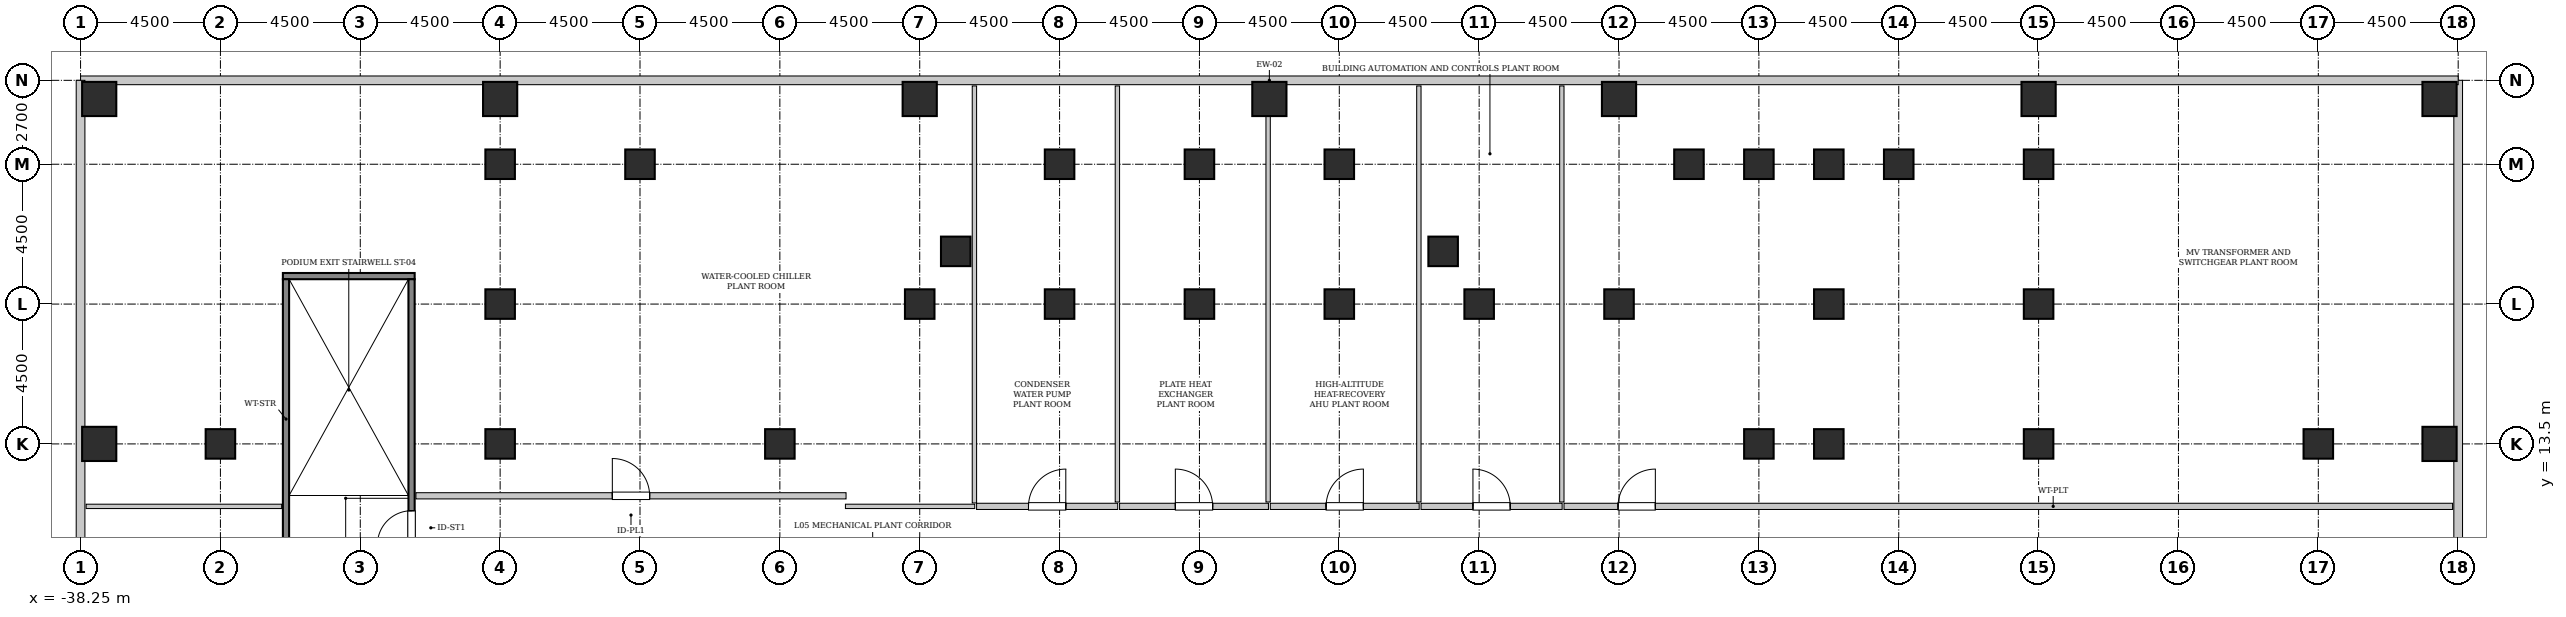
"""IFC4 building model, lengths in metres.
Left out: names, types, materials, properties, quantities, classifications, styles, units other than length and angle.
Written with IfcOpenShell. Run it as: python <this file> out.ifc"""

import sys

from ifc_helpers import new_model, si_unit, direction, frame, frame_2d, origin, origin_2d, place, context, subcontext, project, spatial, rectangle, hollow_rectangle, extrude, source, transform, mapped, element, fill, save


model = new_model("IFC4")
c1 = context("Model", 3, precision=1e-05, world=origin(), true_north=direction((0.0, 1.0)))
c2 = subcontext(c1, "Body", "Model", "MODEL_VIEW")
j1 = project(units=[si_unit("LENGTHUNIT", "METRE"), si_unit("PLANEANGLEUNIT", "RADIAN")], contexts=[c1])
p1 = place(None, origin())
s1 = spatial("IfcSite", under=j1, at=p1, CompositionType="ELEMENT")
p2 = place(p1, origin())
s2 = spatial("IfcBuilding", under=s1, at=p2, CompositionType="ELEMENT")
p3 = place(p2, frame((0.0, 0.0, 27.6)))
s3 = spatial("IfcBuildingStorey", under=s2, at=p3, CompositionType="ELEMENT", Elevation=27.6)
m1 = source(origin(), c2, "Body", "SweptSolid", [
    extrude(hollow_rectangle(XDim=1.1, YDim=1.1, WallThickness=0.055, InnerFilletRadius=0.055, OuterFilletRadius=0.11, at=origin_2d()), origin(), (0.0, 0.0, 1.0), 5.4),
])
for number, where, z_axis, x_axis in (
    (1, (-37.65, 13.5, 0.0), (0.0, 0.0, 1.0), (1.0, 0.0, 0.0)),
    (2, (-37.65, 24.6, 0.0), (0.0, 0.0, 1.0), (1.0, 0.0, 0.0)),
    (3, (-24.75, 24.6, 0.0), (0.0, 0.0, 1.0), (1.0, 0.0, 0.0)),
    (4, (-11.25, 24.6, 0.0), (0.0, 0.0, 1.0), (1.0, 0.0, 0.0)),
    (5, (0.0, 24.6, 0.0), (0.0, 0.0, 1.0), (1.0, 0.0, 0.0)),
    (6, (11.25, 24.6, 0.0), (0.0, 0.0, 1.0), (1.0, 0.0, 0.0)),
    (7, (24.75, 24.6, 0.0), (0.0, 0.0, 1.0), (1.0, 0.0, 0.0)),
    (8, (37.65, 13.5, 0.0), (0.0, 0.0, 1.0), (1.0, 0.0, 0.0)),
    (9, (37.65, 24.6, 0.0), (0.0, 0.0, 1.0), (1.0, 0.0, 0.0)),
):
    element("IfcColumn", number, at=place(p3, frame(where, z_axis=z_axis, x_axis=x_axis)), inside=s3, PredefinedType="COLUMN", context=c2, shape_type="MappedRepresentation", body=[
        mapped(m1, transform((0.0, 0.0, 0.0), x_axis=(1.0, 0.0, 0.0), y_axis=(0.0, 1.0, 0.0), z_axis=(0.0, 0.0, 1.0), scale=1.0)),
    ])
m2 = source(origin(), c2, "Body", "SweptSolid", [
    extrude(hollow_rectangle(XDim=0.95, YDim=0.95, WallThickness=0.045, InnerFilletRadius=0.045, OuterFilletRadius=0.09, at=origin_2d()), origin(), (0.0, 0.0, 1.0), 5.4),
])
for number, where, z_axis, x_axis in (
    (10, (-33.75, 13.5, 0.0), (0.0, 0.0, 1.0), (1.0, 0.0, 0.0)),
    (11, (-24.75, 13.5, 0.0), (0.0, 0.0, 1.0), (1.0, 0.0, 0.0)),
    (12, (-24.75, 18.0, 0.0), (0.0, 0.0, 1.0), (1.0, 0.0, 0.0)),
    (13, (-24.75, 22.5, 0.0), (0.0, 0.0, 1.0), (1.0, 0.0, 0.0)),
    (14, (-20.25, 22.5, 0.0), (0.0, 0.0, 1.0), (1.0, 0.0, 0.0)),
    (15, (-15.75, 13.5, 0.0), (0.0, 0.0, 1.0), (1.0, 0.0, 0.0)),
    (16, (-11.25, 18.0, 0.0), (0.0, 0.0, 1.0), (1.0, 0.0, 0.0)),
    (17, (-10.091, 19.696, 0.0), (0.0, 0.0, 1.0), (1.0, 0.0, 0.0)),
    (18, (-6.75, 18.0, 0.0), (0.0, 0.0, 1.0), (1.0, 0.0, 0.0)),
    (19, (-6.75, 22.5, 0.0), (0.0, 0.0, 1.0), (1.0, 0.0, 0.0)),
    (20, (-2.25, 18.0, 0.0), (0.0, 0.0, 1.0), (1.0, 0.0, 0.0)),
    (21, (-2.25, 22.5, 0.0), (0.0, 0.0, 1.0), (1.0, 0.0, 0.0)),
    (22, (2.25, 18.0, 0.0), (0.0, 0.0, 1.0), (1.0, 0.0, 0.0)),
    (23, (2.25, 22.5, 0.0), (0.0, 0.0, 1.0), (1.0, 0.0, 0.0)),
    (24, (5.591, 19.696, 0.0), (0.0, 0.0, 1.0), (1.0, 0.0, 0.0)),
    (25, (6.75, 18.0, 0.0), (0.0, 0.0, 1.0), (1.0, 0.0, 0.0)),
    (26, (11.25, 18.0, 0.0), (0.0, 0.0, 1.0), (1.0, 0.0, 0.0)),
    (27, (13.5, 22.5, 0.0), (0.0, 0.0, 1.0), (1.0, 0.0, 0.0)),
    (28, (15.75, 13.5, 0.0), (0.0, 0.0, 1.0), (1.0, 0.0, 0.0)),
    (29, (15.75, 22.5, 0.0), (0.0, 0.0, 1.0), (1.0, 0.0, 0.0)),
    (30, (18.0, 13.5, 0.0), (0.0, 0.0, 1.0), (1.0, 0.0, 0.0)),
    (31, (18.0, 18.0, 0.0), (0.0, 0.0, 1.0), (1.0, 0.0, 0.0)),
    (32, (18.0, 22.5, 0.0), (0.0, 0.0, 1.0), (1.0, 0.0, 0.0)),
    (33, (20.25, 22.5, 0.0), (0.0, 0.0, 1.0), (1.0, 0.0, 0.0)),
    (34, (24.75, 13.5, 0.0), (0.0, 0.0, 1.0), (1.0, 0.0, 0.0)),
    (35, (24.75, 18.0, 0.0), (0.0, 0.0, 1.0), (1.0, 0.0, 0.0)),
    (36, (24.75, 22.5, 0.0), (0.0, 0.0, 1.0), (1.0, 0.0, 0.0)),
    (37, (33.75, 13.5, 0.0), (0.0, 0.0, 1.0), (1.0, 0.0, 0.0)),
):
    element("IfcColumn", number, at=place(p3, frame(where, z_axis=z_axis, x_axis=x_axis)), inside=s3, PredefinedType="COLUMN", context=c2, shape_type="MappedRepresentation", body=[
        mapped(m2, transform((0.0, 0.0, 0.0), x_axis=(1.0, 0.0, 0.0), y_axis=(0.0, 1.0, 0.0), z_axis=(0.0, 0.0, 1.0), scale=1.0)),
    ])
m3 = source(origin(), c2, "Body", "SweptSolid", [
    extrude(rectangle(XDim=50.4, YDim=0.28, at=frame_2d((25.2, 0.0))), origin(), (0.0, 0.0, 1.0), 5.15),
])
p4 = place(p3, frame((38.25, -25.2, 0.0), z_axis=(0.0, 0.0, 1.0), x_axis=(0.0, 1.0, 0.0)))
e38 = element("IfcWall", 38, at=p4, inside=s3, PredefinedType="SOLIDWALL", context=c2, shape_type="MappedRepresentation", body=[
    mapped(m3, transform((0.0, 0.0, 0.0), x_axis=(1.0, 0.0, 0.0), y_axis=(0.0, 1.0, 0.0), z_axis=(0.0, 0.0, 1.0), scale=1.0)),
])
m4 = source(origin(), c2, "Body", "SweptSolid", [
    extrude(rectangle(XDim=76.5, YDim=0.28, at=frame_2d((38.25, 0.0))), origin(), (0.0, 0.0, 1.0), 5.15),
])
p5 = place(p3, frame((38.25, 25.2, 0.0), z_axis=(0.0, 0.0, 1.0), x_axis=(-1.0, 0.0, 0.0)))
e39 = element("IfcWall", 39, at=p5, inside=s3, PredefinedType="SOLIDWALL", context=c2, shape_type="MappedRepresentation", body=[
    mapped(m4, transform((0.0, 0.0, 0.0), x_axis=(1.0, 0.0, 0.0), y_axis=(0.0, 1.0, 0.0), z_axis=(0.0, 0.0, 1.0), scale=1.0)),
])
p6 = place(p3, frame((-38.25, 25.2, 0.0), z_axis=(0.0, 0.0, 1.0), x_axis=(0.0, -1.0, 0.0)))
e40 = element("IfcWall", 40, at=p6, inside=s3, PredefinedType="SOLIDWALL", context=c2, shape_type="MappedRepresentation", body=[
    mapped(m3, transform((0.0, 0.0, 0.0), x_axis=(1.0, 0.0, 0.0), y_axis=(0.0, 1.0, 0.0), z_axis=(0.0, 0.0, 1.0), scale=1.0)),
])
m5 = source(origin(), c2, "Body", "SweptSolid", [
    extrude(rectangle(XDim=4.24, YDim=0.2, at=frame_2d((2.12, 0.0))), origin(), (0.0, 0.0, 1.0), 5.15),
])
p7 = place(p3, frame((-27.5, 18.9, 0.0), z_axis=(0.0, 0.0, 1.0), x_axis=(-1.0, 0.0, 0.0)))
e41 = element("IfcWall", 41, at=p7, inside=s3, PredefinedType="SOLIDWALL", context=c2, shape_type="MappedRepresentation", body=[
    mapped(m5, transform((0.0, 0.0, 0.0), x_axis=(1.0, 0.0, 0.0), y_axis=(0.0, 1.0, 0.0), z_axis=(0.0, 0.0, 1.0), scale=1.0)),
])
m6 = source(origin(), c2, "Body", "SweptSolid", [
    extrude(rectangle(XDim=9.0, YDim=0.2, at=frame_2d((4.5, 0.0))), origin(), (0.0, 0.0, 1.0), 5.15),
])
p8 = place(p3, frame((-27.6, 9.8, 0.0), z_axis=(0.0, 0.0, 1.0), x_axis=(0.0, 1.0, 0.0)))
e42 = element("IfcWall", 42, at=p8, inside=s3, PredefinedType="SOLIDWALL", context=c2, shape_type="MappedRepresentation", body=[
    mapped(m6, transform((0.0, 0.0, 0.0), x_axis=(1.0, 0.0, 0.0), y_axis=(0.0, 1.0, 0.0), z_axis=(0.0, 0.0, 1.0), scale=1.0)),
])
p9 = place(p8, frame((0.45, 0.0, 0.0)))
e43 = element("IfcOpeningElement", 43, at=p9, cuts=e42, PredefinedType="OPENING", context=c2, shape_type="SweptSolid", body=[
    extrude(rectangle(XDim=1.1, YDim=2.15, at=frame_2d((0.55, 1.075))), frame((0.0, 0.11, 0.0), z_axis=(0.0, -1.0, 0.0), x_axis=(1.0, 0.0, 0.0)), (0.0, 0.0, 1.0), 0.22),
])
p10 = place(p3, frame((-31.64, 9.8, 0.0), z_axis=(0.0, 0.0, 1.0), x_axis=(0.0, 1.0, 0.0)))
e44 = element("IfcWall", 44, at=p10, inside=s3, PredefinedType="SOLIDWALL", context=c2, shape_type="MappedRepresentation", body=[
    mapped(m6, transform((0.0, 0.0, 0.0), x_axis=(1.0, 0.0, 0.0), y_axis=(0.0, 1.0, 0.0), z_axis=(0.0, 0.0, 1.0), scale=1.0)),
])
m7 = source(origin(), c2, "Body", "SweptSolid", [
    extrude(rectangle(XDim=13.84, YDim=0.2, at=frame_2d((6.92, 0.0))), origin(), (0.0, 0.0, 1.0), 5.135),
])
p11 = place(p3, frame((-27.46, 11.83, 0.0), z_axis=(0.0, 0.0, 1.0), x_axis=(1.0, 0.0, 0.0)))
e45 = element("IfcWall", 45, at=p11, inside=s3, PredefinedType="SOLIDWALL", context=c2, shape_type="MappedRepresentation", body=[
    mapped(m7, transform((0.0, 0.0, 0.0), x_axis=(1.0, 0.0, 0.0), y_axis=(0.0, 1.0, 0.0), z_axis=(0.0, 0.0, 1.0), scale=1.0)),
])
p12 = place(p11, frame((6.32, 0.0, 0.0)))
e46 = element("IfcOpeningElement", 46, at=p12, cuts=e45, PredefinedType="OPENING", context=c2, shape_type="SweptSolid", body=[
    extrude(rectangle(XDim=1.2, YDim=2.15, at=frame_2d((0.6, 1.075))), frame((0.0, 0.11, 0.0), z_axis=(0.0, -1.0, 0.0), x_axis=(1.0, 0.0, 0.0)), (0.0, 0.0, 1.0), 0.22),
])
m8 = source(origin(), c2, "Body", "SweptSolid", [
    extrude(rectangle(XDim=4.16, YDim=0.14, at=frame_2d((2.08, 0.0))), origin(), (0.0, 0.0, 1.0), 5.135),
])
p13 = place(p3, frame((-13.64, 11.49, 0.0), z_axis=(0.0, 0.0, 1.0), x_axis=(1.0, 0.0, 0.0)))
e47 = element("IfcWall", 47, at=p13, inside=s3, PredefinedType="PARTITIONING", context=c2, shape_type="MappedRepresentation", body=[
    mapped(m8, transform((0.0, 0.0, 0.0), x_axis=(1.0, 0.0, 0.0), y_axis=(0.0, 1.0, 0.0), z_axis=(0.0, 0.0, 1.0), scale=1.0)),
])
m9 = source(origin(), c2, "Body", "SweptSolid", [
    extrude(rectangle(XDim=13.42, YDim=0.14, at=frame_2d((6.71, 0.0))), origin(), (0.0, 0.0, 1.0), 5.135),
])
p14 = place(p3, frame((-9.49, 11.6, 0.0), z_axis=(0.0, 0.0, 1.0), x_axis=(0.0, 1.0, 0.0)))
e48 = element("IfcWall", 48, at=p14, inside=s3, PredefinedType="PARTITIONING", context=c2, shape_type="MappedRepresentation", body=[
    mapped(m9, transform((0.0, 0.0, 0.0), x_axis=(1.0, 0.0, 0.0), y_axis=(0.0, 1.0, 0.0), z_axis=(0.0, 0.0, 1.0), scale=1.0)),
])
m10 = source(origin(), c2, "Body", "SweptSolid", [
    extrude(rectangle(XDim=6.29, YDim=0.14, at=frame_2d((3.145, 0.0))), origin(), (0.0, 0.0, 1.0), 5.135),
])
p15 = place(p3, frame((-38.07, 11.49, 0.0), z_axis=(0.0, 0.0, 1.0), x_axis=(1.0, 0.0, 0.0)))
e49 = element("IfcWall", 49, at=p15, inside=s3, PredefinedType="PARTITIONING", context=c2, shape_type="MappedRepresentation", body=[
    mapped(m10, transform((0.0, 0.0, 0.0), x_axis=(1.0, 0.0, 0.0), y_axis=(0.0, 1.0, 0.0), z_axis=(0.0, 0.0, 1.0), scale=1.0)),
])
m11 = source(origin(), c2, "Body", "SweptSolid", [
    extrude(rectangle(XDim=4.54, YDim=0.2, at=frame_2d((2.27, 0.0))), origin(), (0.0, 0.0, 1.0), 5.135),
])
p16 = place(p3, frame((-9.42, 11.49, 0.0), z_axis=(0.0, 0.0, 1.0), x_axis=(1.0, 0.0, 0.0)))
e50 = element("IfcWall", 50, at=p16, inside=s3, PredefinedType="SOLIDWALL", context=c2, shape_type="MappedRepresentation", body=[
    mapped(m11, transform((0.0, 0.0, 0.0), x_axis=(1.0, 0.0, 0.0), y_axis=(0.0, 1.0, 0.0), z_axis=(0.0, 0.0, 1.0), scale=1.0)),
])
p17 = place(p16, frame((1.67, 0.0, 0.0)))
e51 = element("IfcOpeningElement", 51, at=p17, cuts=e50, PredefinedType="OPENING", context=c2, shape_type="SweptSolid", body=[
    extrude(rectangle(XDim=1.2, YDim=2.15, at=frame_2d((0.6, 1.075))), frame((0.0, 0.11, 0.0), z_axis=(0.0, -1.0, 0.0), x_axis=(1.0, 0.0, 0.0)), (0.0, 0.0, 1.0), 0.22),
])
m12 = source(origin(), c2, "Body", "SweptSolid", [
    extrude(rectangle(XDim=13.39, YDim=0.14, at=frame_2d((6.695, 0.0))), origin(), (0.0, 0.0, 1.0), 5.135),
])
p18 = place(p3, frame((-4.89, 11.63, 0.0), z_axis=(0.0, 0.0, 1.0), x_axis=(0.0, 1.0, 0.0)))
e52 = element("IfcWall", 52, at=p18, inside=s3, PredefinedType="PARTITIONING", context=c2, shape_type="MappedRepresentation", body=[
    mapped(m12, transform((0.0, 0.0, 0.0), x_axis=(1.0, 0.0, 0.0), y_axis=(0.0, 1.0, 0.0), z_axis=(0.0, 0.0, 1.0), scale=1.0)),
])
m13 = source(origin(), c2, "Body", "SweptSolid", [
    extrude(rectangle(XDim=4.79, YDim=0.2, at=frame_2d((2.395, 0.0))), origin(), (0.0, 0.0, 1.0), 5.135),
])
p19 = place(p3, frame((-4.82, 11.49, 0.0), z_axis=(0.0, 0.0, 1.0), x_axis=(1.0, 0.0, 0.0)))
e53 = element("IfcWall", 53, at=p19, inside=s3, PredefinedType="SOLIDWALL", context=c2, shape_type="MappedRepresentation", body=[
    mapped(m13, transform((0.0, 0.0, 0.0), x_axis=(1.0, 0.0, 0.0), y_axis=(0.0, 1.0, 0.0), z_axis=(0.0, 0.0, 1.0), scale=1.0)),
])
p20 = place(p19, frame((1.795, 0.0, 0.0)))
e54 = element("IfcOpeningElement", 54, at=p20, cuts=e53, PredefinedType="OPENING", context=c2, shape_type="SweptSolid", body=[
    extrude(rectangle(XDim=1.2, YDim=2.15, at=frame_2d((0.6, 1.075))), frame((0.0, 0.11, 0.0), z_axis=(0.0, -1.0, 0.0), x_axis=(1.0, 0.0, 0.0)), (0.0, 0.0, 1.0), 0.22),
])
p21 = place(p3, frame((-0.04, 11.63, 0.0), z_axis=(0.0, 0.0, 1.0), x_axis=(0.0, 1.0, 0.0)))
e55 = element("IfcWall", 55, at=p21, inside=s3, PredefinedType="PARTITIONING", context=c2, shape_type="MappedRepresentation", body=[
    mapped(m12, transform((0.0, 0.0, 0.0), x_axis=(1.0, 0.0, 0.0), y_axis=(0.0, 1.0, 0.0), z_axis=(0.0, 0.0, 1.0), scale=1.0)),
])
p22 = place(p3, frame((0.03, 11.49, 0.0), z_axis=(0.0, 0.0, 1.0), x_axis=(1.0, 0.0, 0.0)))
e56 = element("IfcWall", 56, at=p22, inside=s3, PredefinedType="SOLIDWALL", context=c2, shape_type="MappedRepresentation", body=[
    mapped(m13, transform((0.0, 0.0, 0.0), x_axis=(1.0, 0.0, 0.0), y_axis=(0.0, 1.0, 0.0), z_axis=(0.0, 0.0, 1.0), scale=1.0)),
])
p23 = place(p22, frame((1.795, 0.0, 0.0)))
e57 = element("IfcOpeningElement", 57, at=p23, cuts=e56, PredefinedType="OPENING", context=c2, shape_type="SweptSolid", body=[
    extrude(rectangle(XDim=1.2, YDim=2.15, at=frame_2d((0.6, 1.075))), frame((0.0, 0.11, 0.0), z_axis=(0.0, -1.0, 0.0), x_axis=(1.0, 0.0, 0.0)), (0.0, 0.0, 1.0), 0.22),
])
p24 = place(p3, frame((4.81, 11.63, 0.0), z_axis=(0.0, 0.0, 1.0), x_axis=(0.0, 1.0, 0.0)))
e58 = element("IfcWall", 58, at=p24, inside=s3, PredefinedType="PARTITIONING", context=c2, shape_type="MappedRepresentation", body=[
    mapped(m12, transform((0.0, 0.0, 0.0), x_axis=(1.0, 0.0, 0.0), y_axis=(0.0, 1.0, 0.0), z_axis=(0.0, 0.0, 1.0), scale=1.0)),
])
p25 = place(p3, frame((4.88, 11.49, 0.0), z_axis=(0.0, 0.0, 1.0), x_axis=(1.0, 0.0, 0.0)))
e59 = element("IfcWall", 59, at=p25, inside=s3, PredefinedType="SOLIDWALL", context=c2, shape_type="MappedRepresentation", body=[
    mapped(m11, transform((0.0, 0.0, 0.0), x_axis=(1.0, 0.0, 0.0), y_axis=(0.0, 1.0, 0.0), z_axis=(0.0, 0.0, 1.0), scale=1.0)),
])
p26 = place(p25, frame((1.67, 0.0, 0.0)))
e60 = element("IfcOpeningElement", 60, at=p26, cuts=e59, PredefinedType="OPENING", context=c2, shape_type="SweptSolid", body=[
    extrude(rectangle(XDim=1.2, YDim=2.15, at=frame_2d((0.6, 1.075))), frame((0.0, 0.11, 0.0), z_axis=(0.0, -1.0, 0.0), x_axis=(1.0, 0.0, 0.0)), (0.0, 0.0, 1.0), 0.22),
])
p27 = place(p3, frame((9.41, 11.63, 0.0), z_axis=(0.0, 0.0, 1.0), x_axis=(0.0, 1.0, 0.0)))
e61 = element("IfcWall", 61, at=p27, inside=s3, PredefinedType="PARTITIONING", context=c2, shape_type="MappedRepresentation", body=[
    mapped(m12, transform((0.0, 0.0, 0.0), x_axis=(1.0, 0.0, 0.0), y_axis=(0.0, 1.0, 0.0), z_axis=(0.0, 0.0, 1.0), scale=1.0)),
])
m14 = source(origin(), c2, "Body", "SweptSolid", [
    extrude(rectangle(XDim=28.59, YDim=0.2, at=frame_2d((14.295, 0.0))), origin(), (0.0, 0.0, 1.0), 5.135),
])
p28 = place(p3, frame((9.48, 11.49, 0.0), z_axis=(0.0, 0.0, 1.0), x_axis=(1.0, 0.0, 0.0)))
e62 = element("IfcWall", 62, at=p28, inside=s3, PredefinedType="SOLIDWALL", context=c2, shape_type="MappedRepresentation", body=[
    mapped(m14, transform((0.0, 0.0, 0.0), x_axis=(1.0, 0.0, 0.0), y_axis=(0.0, 1.0, 0.0), z_axis=(0.0, 0.0, 1.0), scale=1.0)),
])
p29 = place(p28, frame((1.739, 0.0, 0.0)))
e63 = element("IfcOpeningElement", 63, at=p29, cuts=e62, PredefinedType="OPENING", context=c2, shape_type="SweptSolid", body=[
    extrude(rectangle(XDim=1.2, YDim=2.15, at=frame_2d((0.6, 1.075))), frame((0.0, 0.11, 0.0), z_axis=(0.0, -1.0, 0.0), x_axis=(1.0, 0.0, 0.0)), (0.0, 0.0, 1.0), 0.22),
])
m15 = source(origin(), c2, "Body", "SweptSolid", [
    extrude(rectangle(XDim=1.1, YDim=2.15, at=frame_2d((0.55, 1.075))), frame((0.0, 0.025, 0.0), z_axis=(0.0, -1.0, 0.0), x_axis=(1.0, 0.0, 0.0)), (0.0, 0.0, 1.0), 0.05),
])
p30 = place(p9, origin())
e64 = element("IfcDoor", 64, at=p30, inside=s3, OperationType="SINGLE_SWING_LEFT", PredefinedType="DOOR", context=c2, shape_type="MappedRepresentation", body=[
    mapped(m15, transform((0.0, 0.0, 0.0), x_axis=(1.0, 0.0, 0.0), y_axis=(0.0, 1.0, 0.0), z_axis=(0.0, 0.0, 1.0), scale=1.0)),
])
fill(e43, e64)
m16 = source(origin(), c2, "Body", "SweptSolid", [
    extrude(rectangle(XDim=1.2, YDim=2.15, at=frame_2d((0.6, 1.075))), frame((0.0, 0.025, 0.0), z_axis=(0.0, -1.0, 0.0), x_axis=(1.0, 0.0, 0.0)), (0.0, 0.0, 1.0), 0.05),
])
p31 = place(p12, origin())
e65 = element("IfcDoor", 65, at=p31, inside=s3, OperationType="SINGLE_SWING_LEFT", PredefinedType="DOOR", context=c2, shape_type="MappedRepresentation", body=[
    mapped(m16, transform((0.0, 0.0, 0.0), x_axis=(1.0, 0.0, 0.0), y_axis=(0.0, 1.0, 0.0), z_axis=(0.0, 0.0, 1.0), scale=1.0)),
])
fill(e46, e65)
p32 = place(p17, origin())
e66 = element("IfcDoor", 66, at=p32, inside=s3, OperationType="SINGLE_SWING_RIGHT", PredefinedType="DOOR", context=c2, shape_type="MappedRepresentation", body=[
    mapped(m16, transform((0.0, 0.0, 0.0), x_axis=(1.0, 0.0, 0.0), y_axis=(0.0, 1.0, 0.0), z_axis=(0.0, 0.0, 1.0), scale=1.0)),
])
fill(e51, e66)
p33 = place(p20, origin())
e67 = element("IfcDoor", 67, at=p33, inside=s3, OperationType="SINGLE_SWING_LEFT", PredefinedType="DOOR", context=c2, shape_type="MappedRepresentation", body=[
    mapped(m16, transform((0.0, 0.0, 0.0), x_axis=(1.0, 0.0, 0.0), y_axis=(0.0, 1.0, 0.0), z_axis=(0.0, 0.0, 1.0), scale=1.0)),
])
fill(e54, e67)
p34 = place(p23, origin())
e68 = element("IfcDoor", 68, at=p34, inside=s3, OperationType="SINGLE_SWING_RIGHT", PredefinedType="DOOR", context=c2, shape_type="MappedRepresentation", body=[
    mapped(m16, transform((0.0, 0.0, 0.0), x_axis=(1.0, 0.0, 0.0), y_axis=(0.0, 1.0, 0.0), z_axis=(0.0, 0.0, 1.0), scale=1.0)),
])
fill(e57, e68)
p35 = place(p26, origin())
e69 = element("IfcDoor", 69, at=p35, inside=s3, OperationType="SINGLE_SWING_LEFT", PredefinedType="DOOR", context=c2, shape_type="MappedRepresentation", body=[
    mapped(m16, transform((0.0, 0.0, 0.0), x_axis=(1.0, 0.0, 0.0), y_axis=(0.0, 1.0, 0.0), z_axis=(0.0, 0.0, 1.0), scale=1.0)),
])
fill(e60, e69)
p36 = place(p29, origin())
e70 = element("IfcDoor", 70, at=p36, inside=s3, OperationType="SINGLE_SWING_RIGHT", PredefinedType="DOOR", context=c2, shape_type="MappedRepresentation", body=[
    mapped(m16, transform((0.0, 0.0, 0.0), x_axis=(1.0, 0.0, 0.0), y_axis=(0.0, 1.0, 0.0), z_axis=(0.0, 0.0, 1.0), scale=1.0)),
])
fill(e63, e70)
save(model, sys.argv[1])
